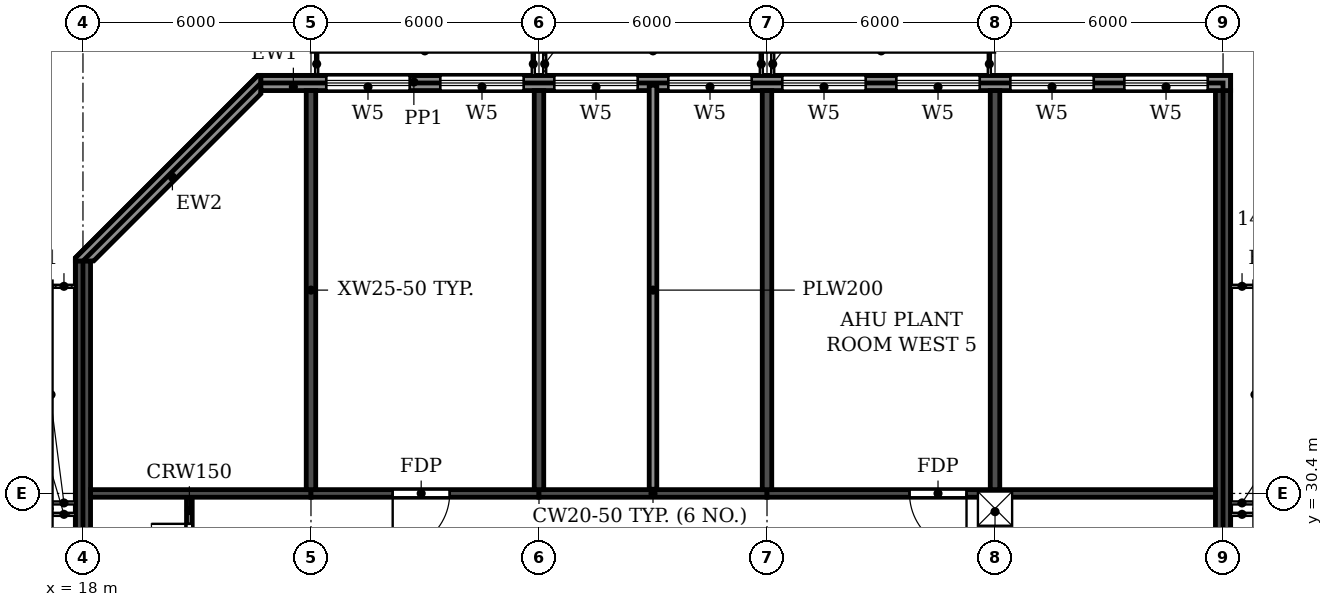
"""IFC4 building model, lengths in metres.
Left out: names, types, materials, properties, quantities, classifications, styles, units other than length and angle.
Written with IfcOpenShell. Run it as: python <this file> out.ifc"""

import sys

from ifc_helpers import new_model, si_unit, direction, frame, frame_2d, origin, origin_2d, place, context, subcontext, project, spatial, polyline, rectangle, outline, extrude, element, fill, save


model = new_model("IFC4")
c1 = context("Model", 3, precision=1e-05, world=origin(), true_north=direction((0.0, 1.0)))
c2 = subcontext(c1, "Body", "Model", "MODEL_VIEW")
j1 = project(units=[si_unit("LENGTHUNIT", "METRE"), si_unit("PLANEANGLEUNIT", "RADIAN")], contexts=[c1])
p1 = place(None, origin())
s1 = spatial("IfcSite", under=j1, at=p1, CompositionType="ELEMENT")
p2 = place(p1, origin())
s2 = spatial("IfcBuilding", under=s1, at=p2, CompositionType="ELEMENT")
p3 = place(p2, frame((0.0, 0.0, 288.9)))
s3 = spatial("IfcBuildingStorey", under=s2, at=p3, CompositionType="ELEMENT", Elevation=288.9)
for number, where, z_axis, x_axis in (
    (1, (24.0, 30.5, 0.0), (0.0, 0.0, 1.0), (0.0, 1.0, 0.0)),
    (2, (30.0, 30.5, 0.0), (0.0, 0.0, 1.0), (0.0, 1.0, 0.0)),
    (3, (36.0, 30.5, 0.0), (0.0, 0.0, 1.0), (0.0, 1.0, 0.0)),
    (4, (42.0, 30.5, 0.0), (0.0, 0.0, 1.0), (0.0, 1.0, 0.0)),
):
    element("IfcWall", number, at=place(p3, frame(where, z_axis=z_axis, x_axis=x_axis)), inside=s3, PredefinedType="SHEAR", context=c2, shape_type="SweptSolid", body=[
        extrude(rectangle(XDim=10.5, YDim=0.25, at=frame_2d((5.25, 0.0))), origin(), (0.0, 0.0, 1.0), 3.05),
    ])
p4 = place(p3, frame((18.0, 4.683, 0.0), z_axis=(0.0, 0.0, 1.0), x_axis=(0.0, 1.0, 0.0)))
e5 = element("IfcWall", 5, at=p4, inside=s3, PredefinedType="SHEAR", context=c2, shape_type="SweptSolid", body=[
    extrude(rectangle(XDim=31.834, YDim=0.4, at=frame_2d((15.917, 0.0))), origin(), (0.0, 0.0, 1.0), 3.05),
])
p5 = place(p3, frame((48.0, 0.2, 0.0), z_axis=(0.0, 0.0, 1.0), x_axis=(0.0, 1.0, 0.0)))
e6 = element("IfcWall", 6, at=p5, inside=s3, PredefinedType="SHEAR", context=c2, shape_type="SweptSolid", body=[
    extrude(rectangle(XDim=40.8, YDim=0.4, at=frame_2d((20.4, 0.0))), origin(), (0.0, 0.0, 1.0), 3.05),
])
p6 = place(p3, frame((18.2, 30.4, 0.0), z_axis=(0.0, 0.0, 1.0), x_axis=(1.0, 0.0, 0.0)))
e7 = element("IfcWall", 7, at=p6, inside=s3, PredefinedType="SHEAR", context=c2, shape_type="SweptSolid", body=[
    extrude(rectangle(XDim=5.8, YDim=0.2, at=frame_2d((2.9, 0.0))), origin(), (0.0, 0.0, 1.0), 2.45),
])
p7 = place(p3, frame((24.0, 30.4, 0.0), z_axis=(0.0, 0.0, 1.0), x_axis=(1.0, 0.0, 0.0)))
e8 = element("IfcWall", 8, at=p7, inside=s3, PredefinedType="SHEAR", context=c2, shape_type="SweptSolid", body=[
    extrude(rectangle(XDim=6.0, YDim=0.2, at=frame_2d((3.0, 0.0))), origin(), (0.0, 0.0, 1.0), 2.45),
])
p8 = place(p7, frame((2.15, 0.0, 0.0)))
e9 = element("IfcOpeningElement", 9, at=p8, cuts=e8, PredefinedType="OPENING", context=c2, shape_type="SweptSolid", body=[
    extrude(rectangle(XDim=1.5, YDim=2.1, at=frame_2d((0.75, 1.05))), frame((0.0, 0.11, 0.0), z_axis=(0.0, -1.0, 0.0), x_axis=(1.0, 0.0, 0.0)), (0.0, 0.0, 1.0), 0.22),
])
p9 = place(p3, frame((30.0, 30.4, 0.0), z_axis=(0.0, 0.0, 1.0), x_axis=(1.0, 0.0, 0.0)))
e10 = element("IfcWall", 10, at=p9, inside=s3, PredefinedType="SHEAR", context=c2, shape_type="SweptSolid", body=[
    extrude(rectangle(XDim=6.0, YDim=0.2, at=frame_2d((3.0, 0.0))), origin(), (0.0, 0.0, 1.0), 2.45),
])
p10 = place(p3, frame((36.0, 30.4, 0.0), z_axis=(0.0, 0.0, 1.0), x_axis=(1.0, 0.0, 0.0)))
e11 = element("IfcWall", 11, at=p10, inside=s3, PredefinedType="SHEAR", context=c2, shape_type="SweptSolid", body=[
    extrude(rectangle(XDim=6.0, YDim=0.2, at=frame_2d((3.0, 0.0))), origin(), (0.0, 0.0, 1.0), 2.45),
])
p11 = place(p10, frame((3.75, 0.0, 0.0)))
e12 = element("IfcOpeningElement", 12, at=p11, cuts=e11, PredefinedType="OPENING", context=c2, shape_type="SweptSolid", body=[
    extrude(rectangle(XDim=1.5, YDim=2.1, at=frame_2d((0.75, 1.05))), frame((0.0, 0.11, 0.0), z_axis=(0.0, -1.0, 0.0), x_axis=(1.0, 0.0, 0.0)), (0.0, 0.0, 1.0), 0.22),
])
p12 = place(p3, frame((42.0, 30.4, 0.0), z_axis=(0.0, 0.0, 1.0), x_axis=(1.0, 0.0, 0.0)))
e13 = element("IfcWall", 13, at=p12, inside=s3, PredefinedType="SHEAR", context=c2, shape_type="SweptSolid", body=[
    extrude(rectangle(XDim=5.8, YDim=0.2, at=frame_2d((2.9, 0.0))), origin(), (0.0, 0.0, 1.0), 2.45),
])
p13 = place(p3, frame((48.2, 41.2, 0.0), z_axis=(0.0, 0.0, 1.0), x_axis=(-1.0, 0.0, 0.0)))
e14 = element("IfcWall", 14, at=p13, inside=s3, PredefinedType="STANDARD", context=c2, shape_type="SweptSolid", body=[
    extrude(rectangle(XDim=25.517, YDim=0.4, at=frame_2d((12.759, 0.0))), origin(), (0.0, 0.0, 1.0), 3.05),
])
p14 = place(p13, frame((21.6, 0.0, 0.6)))
e15 = element("IfcOpeningElement", 15, at=p14, cuts=e14, PredefinedType="OPENING", context=c2, shape_type="SweptSolid", body=[
    extrude(rectangle(XDim=2.2, YDim=2.4, at=frame_2d((1.1, 1.2))), frame((0.0, 0.21, 0.0), z_axis=(0.0, -1.0, 0.0), x_axis=(1.0, 0.0, 0.0)), (0.0, 0.0, 1.0), 0.42),
])
p15 = place(p13, frame((18.6, 0.0, 0.6)))
e16 = element("IfcOpeningElement", 16, at=p15, cuts=e14, PredefinedType="OPENING", context=c2, shape_type="SweptSolid", body=[
    extrude(rectangle(XDim=2.2, YDim=2.4, at=frame_2d((1.1, 1.2))), frame((0.0, 0.21, 0.0), z_axis=(0.0, -1.0, 0.0), x_axis=(1.0, 0.0, 0.0)), (0.0, 0.0, 1.0), 0.42),
])
p16 = place(p13, frame((15.6, 0.0, 0.6)))
e17 = element("IfcOpeningElement", 17, at=p16, cuts=e14, PredefinedType="OPENING", context=c2, shape_type="SweptSolid", body=[
    extrude(rectangle(XDim=2.2, YDim=2.4, at=frame_2d((1.1, 1.2))), frame((0.0, 0.21, 0.0), z_axis=(0.0, -1.0, 0.0), x_axis=(1.0, 0.0, 0.0)), (0.0, 0.0, 1.0), 0.42),
])
p17 = place(p13, frame((12.6, 0.0, 0.6)))
e18 = element("IfcOpeningElement", 18, at=p17, cuts=e14, PredefinedType="OPENING", context=c2, shape_type="SweptSolid", body=[
    extrude(rectangle(XDim=2.2, YDim=2.4, at=frame_2d((1.1, 1.2))), frame((0.0, 0.21, 0.0), z_axis=(0.0, -1.0, 0.0), x_axis=(1.0, 0.0, 0.0)), (0.0, 0.0, 1.0), 0.42),
])
p18 = place(p13, frame((9.6, 0.0, 0.6)))
e19 = element("IfcOpeningElement", 19, at=p18, cuts=e14, PredefinedType="OPENING", context=c2, shape_type="SweptSolid", body=[
    extrude(rectangle(XDim=2.2, YDim=2.4, at=frame_2d((1.1, 1.2))), frame((0.0, 0.21, 0.0), z_axis=(0.0, -1.0, 0.0), x_axis=(1.0, 0.0, 0.0)), (0.0, 0.0, 1.0), 0.42),
])
p19 = place(p13, frame((6.6, 0.0, 0.6)))
e20 = element("IfcOpeningElement", 20, at=p19, cuts=e14, PredefinedType="OPENING", context=c2, shape_type="SweptSolid", body=[
    extrude(rectangle(XDim=2.2, YDim=2.4, at=frame_2d((1.1, 1.2))), frame((0.0, 0.21, 0.0), z_axis=(0.0, -1.0, 0.0), x_axis=(1.0, 0.0, 0.0)), (0.0, 0.0, 1.0), 0.42),
])
p20 = place(p13, frame((3.6, 0.0, 0.6)))
e21 = element("IfcOpeningElement", 21, at=p20, cuts=e14, PredefinedType="OPENING", context=c2, shape_type="SweptSolid", body=[
    extrude(rectangle(XDim=2.2, YDim=2.4, at=frame_2d((1.1, 1.2))), frame((0.0, 0.21, 0.0), z_axis=(0.0, -1.0, 0.0), x_axis=(1.0, 0.0, 0.0)), (0.0, 0.0, 1.0), 0.42),
])
p21 = place(p13, frame((0.6, 0.0, 0.6)))
e22 = element("IfcOpeningElement", 22, at=p21, cuts=e14, PredefinedType="OPENING", context=c2, shape_type="SweptSolid", body=[
    extrude(rectangle(XDim=2.2, YDim=2.4, at=frame_2d((1.1, 1.2))), frame((0.0, 0.21, 0.0), z_axis=(0.0, -1.0, 0.0), x_axis=(1.0, 0.0, 0.0)), (0.0, 0.0, 1.0), 0.42),
])
p22 = place(p3, origin())
e23 = element("IfcWall", 23, at=p22, inside=s3, PredefinedType="STANDARD", context=c2, shape_type="SweptSolid", body=[
    extrude(outline(polyline([(22.683, 41.4), (22.6, 41.4), (17.8, 36.6), (17.8, 36.517), (18.283, 36.517), (22.683, 40.917), (22.683, 41.4)])), origin(), (0.0, 0.0, 1.0), 3.05),
])
p23 = place(p3, frame((0.0, 0.0, 3.3)))
e24 = element("IfcWall", 24, at=p23, inside=s3, PredefinedType="PARAPET", context=c2, shape_type="SweptSolid", body=[
    extrude(outline(polyline([(22.6, -0.2), (48.2, -0.2), (48.2, 41.4), (22.6, 41.4), (17.8, 36.6), (17.8, 4.6), (22.6, -0.2)]), holes=[polyline([(22.683, 0.0), (18.0, 4.683), (18.0, 36.517), (22.683, 41.2), (48.0, 41.2), (48.0, 0.0), (22.683, 0.0)])]), origin(), (0.0, 0.0, 1.0), 1.1),
])
p24 = place(p3, frame((20.8, 27.9, 0.0), z_axis=(0.0, 0.0, 1.0), x_axis=(0.0, 1.0, 0.0)))
e25 = element("IfcWall", 25, at=p24, inside=s3, PredefinedType="PARTITIONING", context=c2, shape_type="SweptSolid", body=[
    extrude(rectangle(XDim=2.39, YDim=0.15, at=frame_2d((1.195, 0.0))), origin(), (0.0, 0.0, 1.0), 3.05),
])
p25 = place(p24, frame((0.7, 0.0, 0.0)))
e26 = element("IfcOpeningElement", 26, at=p25, cuts=e25, PredefinedType="OPENING", context=c2, shape_type="SweptSolid", body=[
    extrude(rectangle(XDim=1.0, YDim=2.1, at=frame_2d((0.5, 1.05))), frame((0.0, 0.085, 0.0), z_axis=(0.0, -1.0, 0.0), x_axis=(1.0, 0.0, 0.0)), (0.0, 0.0, 1.0), 0.17),
])
p26 = place(p3, frame((33.0, 30.51, 0.0), z_axis=(0.0, 0.0, 1.0), x_axis=(0.0, 1.0, 0.0)))
e27 = element("IfcWall", 27, at=p26, inside=s3, PredefinedType="PARTITIONING", context=c2, shape_type="SweptSolid", body=[
    extrude(rectangle(XDim=10.63, YDim=0.2, at=frame_2d((5.315, 0.0))), origin(), (0.0, 0.0, 1.0), 3.05),
])
p27 = place(p14, origin())
e28 = element("IfcWindow", 28, at=p27, inside=s3, PartitioningType="TRIPLE_PANEL_HORIZONTAL", PredefinedType="WINDOW", context=c2, shape_type="SweptSolid", body=[
    extrude(rectangle(XDim=2.2, YDim=2.4, at=frame_2d((1.1, 1.2))), frame((0.0, 0.03, 0.0), z_axis=(0.0, -1.0, 0.0), x_axis=(1.0, 0.0, 0.0)), (0.0, 0.0, 1.0), 0.06),
])
fill(e15, e28)
p28 = place(p15, origin())
e29 = element("IfcWindow", 29, at=p28, inside=s3, PartitioningType="TRIPLE_PANEL_HORIZONTAL", PredefinedType="WINDOW", context=c2, shape_type="SweptSolid", body=[
    extrude(rectangle(XDim=2.2, YDim=2.4, at=frame_2d((1.1, 1.2))), frame((0.0, 0.03, 0.0), z_axis=(0.0, -1.0, 0.0), x_axis=(1.0, 0.0, 0.0)), (0.0, 0.0, 1.0), 0.06),
])
fill(e16, e29)
p29 = place(p16, origin())
e30 = element("IfcWindow", 30, at=p29, inside=s3, PartitioningType="TRIPLE_PANEL_HORIZONTAL", PredefinedType="WINDOW", context=c2, shape_type="SweptSolid", body=[
    extrude(rectangle(XDim=2.2, YDim=2.4, at=frame_2d((1.1, 1.2))), frame((0.0, 0.03, 0.0), z_axis=(0.0, -1.0, 0.0), x_axis=(1.0, 0.0, 0.0)), (0.0, 0.0, 1.0), 0.06),
])
fill(e17, e30)
p30 = place(p17, origin())
e31 = element("IfcWindow", 31, at=p30, inside=s3, PartitioningType="TRIPLE_PANEL_HORIZONTAL", PredefinedType="WINDOW", context=c2, shape_type="SweptSolid", body=[
    extrude(rectangle(XDim=2.2, YDim=2.4, at=frame_2d((1.1, 1.2))), frame((0.0, 0.03, 0.0), z_axis=(0.0, -1.0, 0.0), x_axis=(1.0, 0.0, 0.0)), (0.0, 0.0, 1.0), 0.06),
])
fill(e18, e31)
p31 = place(p18, origin())
e32 = element("IfcWindow", 32, at=p31, inside=s3, PartitioningType="TRIPLE_PANEL_HORIZONTAL", PredefinedType="WINDOW", context=c2, shape_type="SweptSolid", body=[
    extrude(rectangle(XDim=2.2, YDim=2.4, at=frame_2d((1.1, 1.2))), frame((0.0, 0.03, 0.0), z_axis=(0.0, -1.0, 0.0), x_axis=(1.0, 0.0, 0.0)), (0.0, 0.0, 1.0), 0.06),
])
fill(e19, e32)
p32 = place(p19, origin())
e33 = element("IfcWindow", 33, at=p32, inside=s3, PartitioningType="TRIPLE_PANEL_HORIZONTAL", PredefinedType="WINDOW", context=c2, shape_type="SweptSolid", body=[
    extrude(rectangle(XDim=2.2, YDim=2.4, at=frame_2d((1.1, 1.2))), frame((0.0, 0.03, 0.0), z_axis=(0.0, -1.0, 0.0), x_axis=(1.0, 0.0, 0.0)), (0.0, 0.0, 1.0), 0.06),
])
fill(e20, e33)
p33 = place(p20, origin())
e34 = element("IfcWindow", 34, at=p33, inside=s3, PartitioningType="TRIPLE_PANEL_HORIZONTAL", PredefinedType="WINDOW", context=c2, shape_type="SweptSolid", body=[
    extrude(rectangle(XDim=2.2, YDim=2.4, at=frame_2d((1.1, 1.2))), frame((0.0, 0.03, 0.0), z_axis=(0.0, -1.0, 0.0), x_axis=(1.0, 0.0, 0.0)), (0.0, 0.0, 1.0), 0.06),
])
fill(e21, e34)
p34 = place(p21, origin())
e35 = element("IfcWindow", 35, at=p34, inside=s3, PartitioningType="TRIPLE_PANEL_HORIZONTAL", PredefinedType="WINDOW", context=c2, shape_type="SweptSolid", body=[
    extrude(rectangle(XDim=2.2, YDim=2.4, at=frame_2d((1.1, 1.2))), frame((0.0, 0.03, 0.0), z_axis=(0.0, -1.0, 0.0), x_axis=(1.0, 0.0, 0.0)), (0.0, 0.0, 1.0), 0.06),
])
fill(e22, e35)
p35 = place(p2, frame((0.0, 0.0, 292.2)))
p36 = place(p35, frame((22.6, -0.2, -0.25)))
p37 = place(p36, frame((19.4, 30.2, -0.01)))
p38 = place(p37, frame((0.0, 0.0, 0.21)))
e36 = element("IfcWindow", 36, at=p38, inside=s3, PartitioningType="SINGLE_PANEL", PredefinedType="SKYLIGHT", context=c2, shape_type="SweptSolid", body=[
    extrude(rectangle(XDim=0.9, YDim=0.9, at=origin_2d()), origin(), (0.0, 0.0, 1.0), 0.05),
])
p39 = place(p8, frame((1.5, 0.0, 0.0), z_axis=(0.0, 0.0, 1.0), x_axis=(-1.0, 0.0, 0.0)))
e37 = element("IfcDoor", 37, at=p39, inside=s3, OperationType="DOUBLE_DOOR_SINGLE_SWING", PredefinedType="DOOR", context=c2, shape_type="SweptSolid", body=[
    extrude(rectangle(XDim=1.5, YDim=2.1, at=frame_2d((0.75, 1.05))), frame((0.0, 0.025, 0.0), z_axis=(0.0, -1.0, 0.0), x_axis=(1.0, 0.0, 0.0)), (0.0, 0.0, 1.0), 0.05),
])
fill(e9, e37)
p40 = place(p11, frame((1.5, 0.0, 0.0), z_axis=(0.0, 0.0, 1.0), x_axis=(-1.0, 0.0, 0.0)))
e38 = element("IfcDoor", 38, at=p40, inside=s3, OperationType="DOUBLE_DOOR_SINGLE_SWING", PredefinedType="DOOR", context=c2, shape_type="SweptSolid", body=[
    extrude(rectangle(XDim=1.5, YDim=2.1, at=frame_2d((0.75, 1.05))), frame((0.0, 0.025, 0.0), z_axis=(0.0, -1.0, 0.0), x_axis=(1.0, 0.0, 0.0)), (0.0, 0.0, 1.0), 0.05),
])
fill(e12, e38)
p41 = place(p25, origin())
e39 = element("IfcDoor", 39, at=p41, inside=s3, OperationType="SINGLE_SWING_RIGHT", PredefinedType="DOOR", context=c2, shape_type="SweptSolid", body=[
    extrude(rectangle(XDim=1.0, YDim=2.1, at=frame_2d((0.5, 1.05))), frame((0.0, 0.025, 0.0), z_axis=(0.0, -1.0, 0.0), x_axis=(1.0, 0.0, 0.0)), (0.0, 0.0, 1.0), 0.05),
])
fill(e26, e39)
save(model, sys.argv[1])
